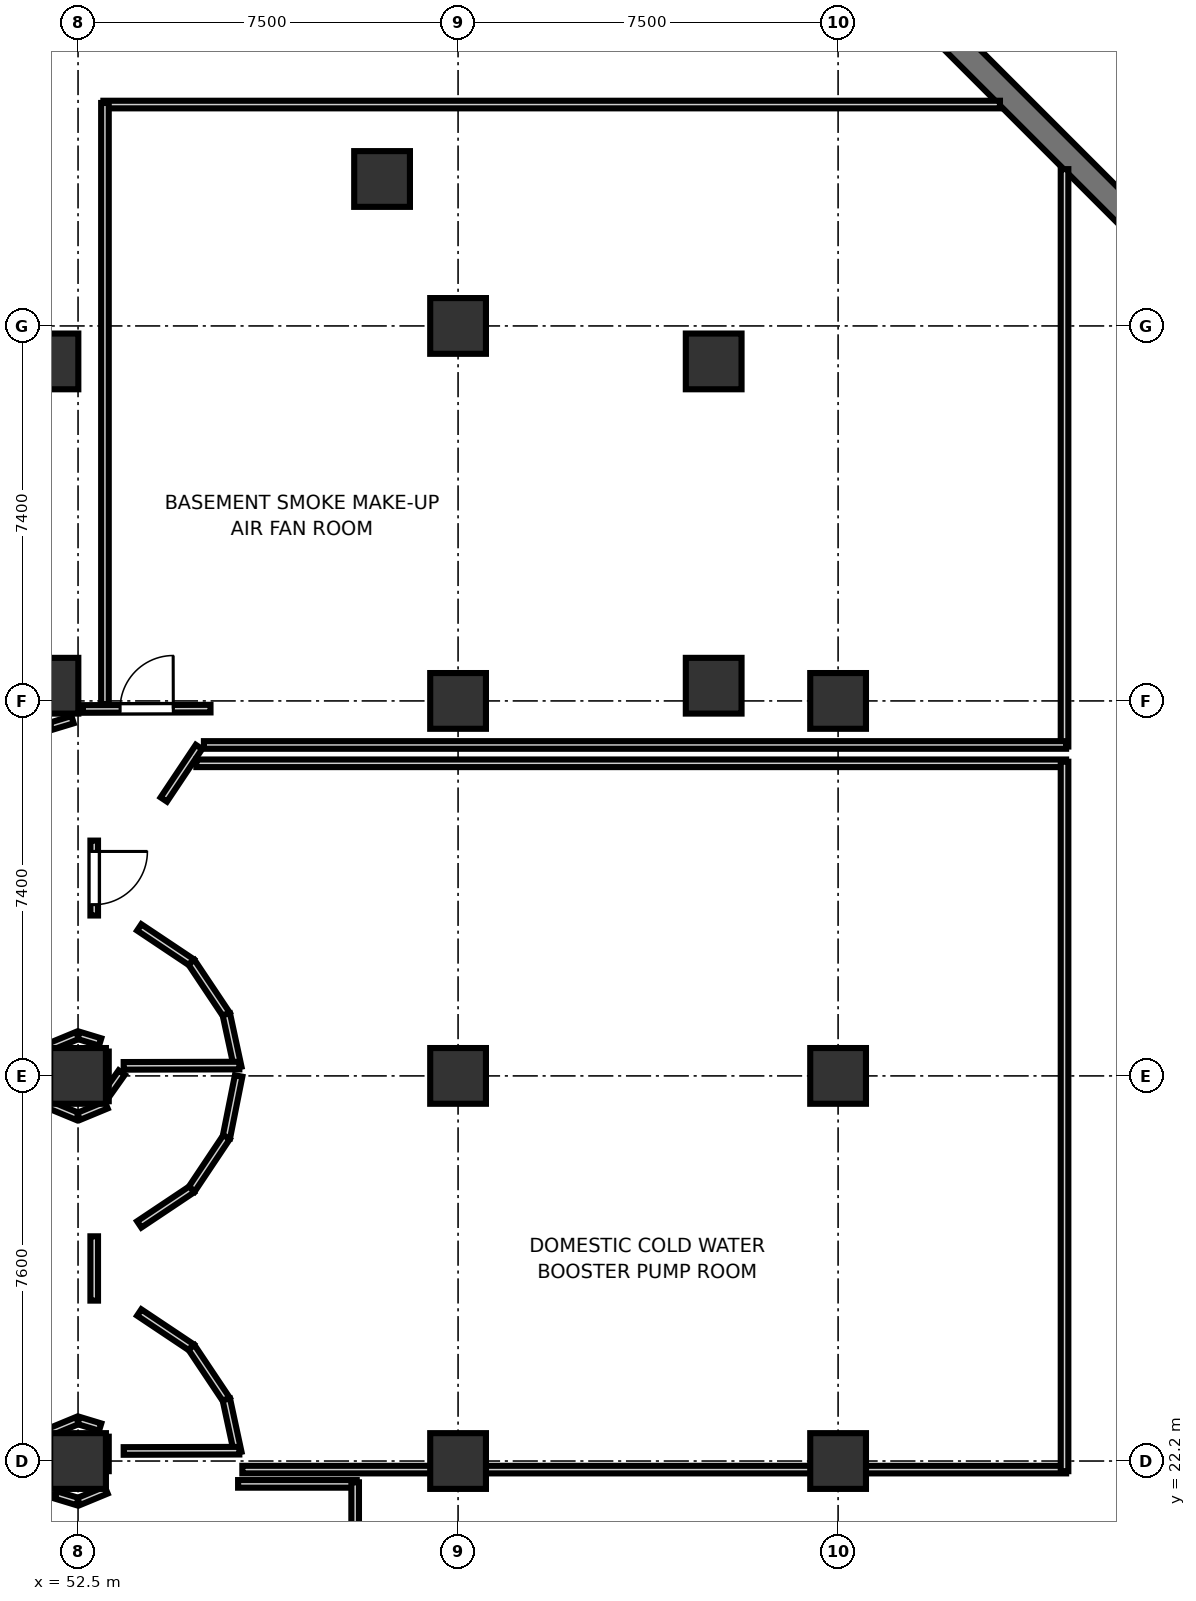
"""IFC4 building model, lengths in metres.
Left out: names, types, materials, properties, quantities, classifications, styles, units other than length and angle.
Written with IfcOpenShell. Run it as: python <this file> out.ifc"""

import sys

from ifc_helpers import new_model, si_unit, direction, frame, frame_2d, origin, origin_2d, place, context, subcontext, project, spatial, rectangle, extrude, element, fill, save


model = new_model("IFC4")
c1 = context("Model", 3, precision=1e-05, world=origin(), true_north=direction((0.0, 1.0)))
c2 = subcontext(c1, "Body", "Model", "MODEL_VIEW")
j1 = project(units=[si_unit("LENGTHUNIT", "METRE"), si_unit("PLANEANGLEUNIT", "RADIAN")], contexts=[c1])
p1 = place(None, origin())
s1 = spatial("IfcSite", under=j1, at=p1, CompositionType="ELEMENT")
p2 = place(p1, origin())
s2 = spatial("IfcBuilding", under=s1, at=p2, CompositionType="ELEMENT")
p3 = place(p2, frame((0.0, 0.0, -5.6)))
s3 = spatial("IfcBuildingStorey", under=s2, at=p3, CompositionType="ELEMENT", Elevation=-5.6)
for number, where, z_axis, x_axis in (
    (1, (51.955, 43.9, 0.0), (0.0, 0.0, 1.0), (1.0, 0.0, 0.0)),
    (2, (51.955, 37.5, 0.0), (0.0, 0.0, 1.0), (1.0, 0.0, 0.0)),
    (3, (65.045, 43.9, 0.0), (0.0, 0.0, 1.0), (1.0, 0.0, 0.0)),
    (4, (65.045, 37.5, 0.0), (0.0, 0.0, 1.0), (1.0, 0.0, 0.0)),
    (5, (52.5, 22.2, 0.0), (0.0, 0.0, 1.0), (1.0, 0.0, 0.0)),
    (6, (52.5, 29.8, 0.0), (0.0, 0.0, 1.0), (1.0, 0.0, 0.0)),
    (7, (60.0, 22.2, 0.0), (0.0, 0.0, 1.0), (1.0, 0.0, 0.0)),
    (8, (60.0, 29.8, 0.0), (0.0, 0.0, 1.0), (1.0, 0.0, 0.0)),
    (9, (60.0, 37.2, 0.0), (0.0, 0.0, 1.0), (1.0, 0.0, 0.0)),
    (10, (60.0, 44.6, 0.0), (0.0, 0.0, 1.0), (1.0, 0.0, 0.0)),
    (11, (67.5, 22.2, 0.0), (0.0, 0.0, 1.0), (1.0, 0.0, 0.0)),
    (12, (67.5, 29.8, 0.0), (0.0, 0.0, 1.0), (1.0, 0.0, 0.0)),
    (13, (67.5, 37.2, 0.0), (0.0, 0.0, 1.0), (1.0, 0.0, 0.0)),
    (14, (58.5, 47.5, 0.0), (0.0, 0.0, 1.0), (1.0, 0.0, 0.0)),
):
    element("IfcColumn", number, at=place(p3, frame(where, z_axis=z_axis, x_axis=x_axis)), inside=s3, PredefinedType="COLUMN", context=c2, shape_type="SweptSolid", body=[
        extrude(rectangle(XDim=1.1, YDim=1.1, at=origin_2d()), origin(), (0.0, 0.0, 1.0), 5.6),
    ])
p4 = place(p3, frame((73.5, 46.5, 0.0), z_axis=(0.0, 0.0, 1.0), x_axis=(-0.707106781187, 0.707106781187, 0.0)))
e15 = element("IfcWall", 15, at=p4, inside=s3, PredefinedType="SOLIDWALL", context=c2, shape_type="SweptSolid", body=[
    extrude(rectangle(XDim=5.657, YDim=0.5, at=frame_2d((2.828, 0.0))), origin(), (0.0, 0.0, 1.0), 5.3),
])
p5 = place(p3, frame((51.964, 36.7, 0.0), z_axis=(0.0, 0.0, 1.0), x_axis=(0.956858887343, 0.290553041134, 0.0)))
e16 = element("IfcWall", 16, at=p5, inside=s3, PredefinedType="PARTITIONING", context=c2, shape_type="SweptSolid", body=[
    extrude(rectangle(XDim=0.447, YDim=0.15, at=frame_2d((0.224, 0.0))), origin(), (0.0, 0.0, 1.0), 4.62),
])
p6 = place(p3, frame((52.596, 37.042, 0.0), z_axis=(0.0, 0.0, 1.0), x_axis=(0.999996822684, 0.002520837443, 0.0)))
e17 = element("IfcWall", 17, at=p6, inside=s3, PredefinedType="PARTITIONING", context=c2, shape_type="SweptSolid", body=[
    extrude(rectangle(XDim=2.518, YDim=0.15, at=frame_2d((1.259, 0.0))), origin(), (0.0, 0.0, 1.0), 4.62),
])
p7 = place(p6, frame((0.734, 0.0, 0.0)))
e18 = element("IfcOpeningElement", 18, at=p7, cuts=e17, PredefinedType="OPENING", context=c2, shape_type="SweptSolid", body=[
    extrude(rectangle(XDim=1.05, YDim=2.15, at=frame_2d((0.525, 1.075))), frame((0.0, 0.085, 0.0), z_axis=(0.0, -1.0, 0.0), x_axis=(1.0, 0.0, 0.0)), (0.0, 0.0, 1.0), 0.17),
])
p8 = place(p3, frame((54.886, 36.292, 0.0), z_axis=(0.0, 0.0, 1.0), x_axis=(-0.555557312883, -0.831478245117, 0.0)))
e19 = element("IfcWall", 19, at=p8, inside=s3, PredefinedType="PARTITIONING", context=c2, shape_type="SweptSolid", body=[
    extrude(rectangle(XDim=1.249, YDim=0.15, at=frame_2d((0.624, 0.0))), origin(), (0.0, 0.0, 1.0), 4.62),
])
p9 = place(p3, frame((52.819, 34.444, 0.0), z_axis=(0.0, 0.0, 1.0), x_axis=(0.0, -1.0, 0.0)))
e20 = element("IfcWall", 20, at=p9, inside=s3, PredefinedType="PARTITIONING", context=c2, shape_type="SweptSolid", body=[
    extrude(rectangle(XDim=1.478, YDim=0.15, at=frame_2d((0.739, 0.0))), origin(), (0.0, 0.0, 1.0), 4.62),
])
p10 = place(p9, frame((0.214, 0.0, 0.0)))
e21 = element("IfcOpeningElement", 21, at=p10, cuts=e20, PredefinedType="OPENING", context=c2, shape_type="SweptSolid", body=[
    extrude(rectangle(XDim=1.05, YDim=2.15, at=frame_2d((0.525, 1.075))), frame((0.0, 0.085, 0.0), z_axis=(0.0, -1.0, 0.0), x_axis=(1.0, 0.0, 0.0)), (0.0, 0.0, 1.0), 0.17),
])
for number, where, z_axis, x_axis in (
    (22, (53.708, 32.731, 0.0), (0.0, 0.0, 1.0), (0.831, -0.556, 0.0)),
    (23, (54.737, 32.045, 0.0), (0.0, 0.0, 1.0), (0.556, -0.831, 0.0)),
):
    element("IfcWall", number, at=place(p3, frame(where, z_axis=z_axis, x_axis=x_axis)), inside=s3, PredefinedType="PARTITIONING", context=c2, shape_type="SweptSolid", body=[
        extrude(rectangle(XDim=1.249, YDim=0.15, at=frame_2d((0.624, 0.0))), origin(), (0.0, 0.0, 1.0), 4.62),
    ])
p11 = place(p3, frame((55.426, 31.018, 0.0), z_axis=(0.0, 0.0, 1.0), x_axis=(0.210629490676, -0.977565965885, 0.0)))
e24 = element("IfcWall", 24, at=p11, inside=s3, PredefinedType="PARTITIONING", context=c2, shape_type="SweptSolid", body=[
    extrude(rectangle(XDim=1.076, YDim=0.15, at=frame_2d((0.538, 0.0))), origin(), (0.0, 0.0, 1.0), 4.62),
])
p12 = place(p3, frame((55.683, 30.004, 0.0), z_axis=(0.0, 0.0, 1.0), x_axis=(-0.99999670426, -0.002567385634, 0.0)))
e25 = element("IfcWall", 25, at=p12, inside=s3, PredefinedType="PARTITIONING", context=c2, shape_type="SweptSolid", body=[
    extrude(rectangle(XDim=2.282, YDim=0.15, at=frame_2d((1.141, 0.0))), origin(), (0.0, 0.0, 1.0), 4.62),
])
p13 = place(p3, frame((52.937, 30.47, 0.0), z_axis=(0.0, 0.0, 1.0), x_axis=(-0.957010621041, 0.290052876583, 0.0)))
e26 = element("IfcWall", 26, at=p13, inside=s3, PredefinedType="PARTITIONING", context=c2, shape_type="SweptSolid", body=[
    extrude(rectangle(XDim=0.447, YDim=0.15, at=frame_2d((0.224, 0.0))), origin(), (0.0, 0.0, 1.0), 4.62),
])
p14 = place(p3, frame((52.488, 30.599, 0.0), z_axis=(0.0, 0.0, 1.0), x_axis=(-0.923835035561, -0.382790839847, 0.0)))
e27 = element("IfcWall", 27, at=p14, inside=s3, PredefinedType="PARTITIONING", context=c2, shape_type="SweptSolid", body=[
    extrude(rectangle(XDim=0.589, YDim=0.15, at=frame_2d((0.295, 0.0))), origin(), (0.0, 0.0, 1.0), 4.62),
])
for number, where, z_axis, x_axis in (
    (28, (51.944, 29.227, 0.0), (0.0, 0.0, 1.0), (0.924, -0.382, 0.0)),
    (29, (52.512, 29.001, 0.0), (0.0, 0.0, 1.0), (0.924, 0.382, 0.0)),
):
    element("IfcWall", number, at=place(p3, frame(where, z_axis=z_axis, x_axis=x_axis)), inside=s3, PredefinedType="PARTITIONING", context=c2, shape_type="SweptSolid", body=[
        extrude(rectangle(XDim=0.589, YDim=0.15, at=frame_2d((0.294, 0.0))), origin(), (0.0, 0.0, 1.0), 4.62),
    ])
p15 = place(p3, frame((55.669, 29.799, 0.0), z_axis=(0.0, 0.0, 1.0), x_axis=(-0.195624591427, -0.980678856318, 0.0)))
e30 = element("IfcWall", 30, at=p15, inside=s3, PredefinedType="PARTITIONING", context=c2, shape_type="SweptSolid", body=[
    extrude(rectangle(XDim=1.242, YDim=0.15, at=frame_2d((0.621, 0.0))), origin(), (0.0, 0.0, 1.0), 4.62),
])
for number, where, z_axis, x_axis in (
    (31, (55.431, 28.593, 0.0), (0.0, 0.0, 1.0), (-0.556, -0.831, 0.0)),
    (32, (54.746, 27.563, 0.0), (0.0, 0.0, 1.0), (-0.831, -0.556, 0.0)),
):
    element("IfcWall", number, at=place(p3, frame(where, z_axis=z_axis, x_axis=x_axis)), inside=s3, PredefinedType="PARTITIONING", context=c2, shape_type="SweptSolid", body=[
        extrude(rectangle(XDim=1.249, YDim=0.15, at=frame_2d((0.624, 0.0))), origin(), (0.0, 0.0, 1.0), 4.62),
    ])
p16 = place(p3, frame((52.819, 26.635, 0.0), z_axis=(0.0, 0.0, 1.0), x_axis=(0.0, -1.0, 0.0)))
e33 = element("IfcWall", 33, at=p16, inside=s3, PredefinedType="PARTITIONING", context=c2, shape_type="SweptSolid", body=[
    extrude(rectangle(XDim=1.269, YDim=0.15, at=frame_2d((0.635, 0.0))), origin(), (0.0, 0.0, 1.0), 4.62),
])
for number, where, z_axis, x_axis in (
    (34, (53.708, 25.131, 0.0), (0.0, 0.0, 1.0), (0.831, -0.556, 0.0)),
    (35, (54.737, 24.446, 0.0), (0.0, 0.0, 1.0), (0.556, -0.831, 0.0)),
):
    element("IfcWall", number, at=place(p3, frame(where, z_axis=z_axis, x_axis=x_axis)), inside=s3, PredefinedType="PARTITIONING", context=c2, shape_type="SweptSolid", body=[
        extrude(rectangle(XDim=1.249, YDim=0.15, at=frame_2d((0.624, 0.0))), origin(), (0.0, 0.0, 1.0), 4.62),
    ])
p17 = place(p3, frame((55.426, 23.418, 0.0), z_axis=(0.0, 0.0, 1.0), x_axis=(0.210582766426, -0.977576032073, 0.0)))
e36 = element("IfcWall", 36, at=p17, inside=s3, PredefinedType="PARTITIONING", context=c2, shape_type="SweptSolid", body=[
    extrude(rectangle(XDim=1.076, YDim=0.15, at=frame_2d((0.538, 0.0))), origin(), (0.0, 0.0, 1.0), 4.62),
])
p18 = place(p3, frame((55.683, 22.404, 0.0), z_axis=(0.0, 0.0, 1.0), x_axis=(-0.999996973182, -0.002460411894, 0.0)))
e37 = element("IfcWall", 37, at=p18, inside=s3, PredefinedType="PARTITIONING", context=c2, shape_type="SweptSolid", body=[
    extrude(rectangle(XDim=2.282, YDim=0.15, at=frame_2d((1.141, 0.0))), origin(), (0.0, 0.0, 1.0), 4.62),
])
p19 = place(p3, frame((52.937, 22.87, 0.0), z_axis=(0.0, 0.0, 1.0), x_axis=(-0.956858887343, 0.290553041134, 0.0)))
e38 = element("IfcWall", 38, at=p19, inside=s3, PredefinedType="PARTITIONING", context=c2, shape_type="SweptSolid", body=[
    extrude(rectangle(XDim=0.447, YDim=0.15, at=frame_2d((0.224, 0.0))), origin(), (0.0, 0.0, 1.0), 4.62),
])
p20 = place(p3, frame((52.488, 22.999, 0.0), z_axis=(0.0, 0.0, 1.0), x_axis=(-0.923981493772, -0.382437183296, 0.0)))
e39 = element("IfcWall", 39, at=p20, inside=s3, PredefinedType="PARTITIONING", context=c2, shape_type="SweptSolid", body=[
    extrude(rectangle(XDim=0.589, YDim=0.15, at=frame_2d((0.294, 0.0))), origin(), (0.0, 0.0, 1.0), 4.62),
])
p21 = place(p3, frame((51.719, 22.033, 0.0), z_axis=(0.0, 0.0, 1.0), x_axis=(0.555369021078, -0.831604022613, 0.0)))
e40 = element("IfcWall", 40, at=p21, inside=s3, PredefinedType="PARTITIONING", context=c2, shape_type="SweptSolid", body=[
    extrude(rectangle(XDim=0.59, YDim=0.15, at=frame_2d((0.295, 0.0))), origin(), (0.0, 0.0, 1.0), 4.62),
])
p22 = place(p3, frame((52.063, 21.53, 0.0), z_axis=(0.0, 0.0, 1.0), x_axis=(0.957010621041, -0.290052876583, 0.0)))
e41 = element("IfcWall", 41, at=p22, inside=s3, PredefinedType="PARTITIONING", context=c2, shape_type="SweptSolid", body=[
    extrude(rectangle(XDim=0.447, YDim=0.15, at=frame_2d((0.224, 0.0))), origin(), (0.0, 0.0, 1.0), 4.62),
])
p23 = place(p3, frame((52.512, 21.401, 0.0), z_axis=(0.0, 0.0, 1.0), x_axis=(0.923835035561, 0.382790839847, 0.0)))
e42 = element("IfcWall", 42, at=p23, inside=s3, PredefinedType="PARTITIONING", context=c2, shape_type="SweptSolid", body=[
    extrude(rectangle(XDim=0.589, YDim=0.15, at=frame_2d((0.295, 0.0))), origin(), (0.0, 0.0, 1.0), 4.62),
])
p24 = place(p3, frame((55.659, 21.749, 0.0), z_axis=(0.0, 0.0, 1.0), x_axis=(1.0, 0.0, 0.0)))
e43 = element("IfcWall", 43, at=p24, inside=s3, PredefinedType="PARTITIONING", context=c2, shape_type="SweptSolid", body=[
    extrude(rectangle(XDim=2.341, YDim=0.15, at=frame_2d((1.171, 0.0))), origin(), (0.0, 0.0, 1.0), 4.62),
])
p25 = place(p3, frame((57.969, 21.78, 0.0), z_axis=(0.0, 0.0, 1.0), x_axis=(0.0, -1.0, 0.0)))
e44 = element("IfcWall", 44, at=p25, inside=s3, PredefinedType="PARTITIONING", context=c2, shape_type="SweptSolid", body=[
    extrude(rectangle(XDim=3.23, YDim=0.15, at=frame_2d((1.615, 0.0))), origin(), (0.0, 0.0, 1.0), 4.62),
])
p26 = place(p3, frame((72.0, 22.031, 0.0), z_axis=(0.0, 0.0, 1.0), x_axis=(-1.0, 0.0, 0.0)))
e45 = element("IfcWall", 45, at=p26, inside=s3, PredefinedType="PARTITIONING", context=c2, shape_type="SweptSolid", body=[
    extrude(rectangle(XDim=16.257, YDim=0.15, at=frame_2d((8.129, 0.0))), origin(), (0.0, 0.0, 1.0), 4.62),
])
p27 = place(p3, frame((53.031, 22.0, 0.0), z_axis=(0.0, 0.0, 1.0), x_axis=(0.0, 1.0, 0.0)))
e46 = element("IfcWall", 46, at=p27, inside=s3, PredefinedType="PARTITIONING", context=c2, shape_type="SweptSolid", body=[
    extrude(rectangle(XDim=0.68, YDim=0.15, at=frame_2d((0.34, 0.0))), origin(), (0.0, 0.0, 1.0), 4.62),
])
p28 = place(p3, frame((53.362, 29.866, 0.0), z_axis=(0.0, 0.0, 1.0), x_axis=(-0.577825504344, -0.816160331387, 0.0)))
e47 = element("IfcWall", 47, at=p28, inside=s3, PredefinedType="PARTITIONING", context=c2, shape_type="SweptSolid", body=[
    extrude(rectangle(XDim=0.671, YDim=0.15, at=frame_2d((0.335, 0.0))), origin(), (0.0, 0.0, 1.0), 4.62),
])
p29 = place(p3, frame((53.031, 29.301, 0.0), z_axis=(0.0, 0.0, 1.0), x_axis=(0.0, 1.0, 0.0)))
e48 = element("IfcWall", 48, at=p29, inside=s3, PredefinedType="PARTITIONING", context=c2, shape_type="SweptSolid", body=[
    extrude(rectangle(XDim=0.98, YDim=0.15, at=frame_2d((0.49, 0.0))), origin(), (0.0, 0.0, 1.0), 4.62),
])
p30 = place(p3, frame((54.835, 35.969, 0.0), z_axis=(0.0, 0.0, 1.0), x_axis=(1.0, 0.0, 0.0)))
e49 = element("IfcWall", 49, at=p30, inside=s3, PredefinedType="PARTITIONING", context=c2, shape_type="SweptSolid", body=[
    extrude(rectangle(XDim=17.165, YDim=0.15, at=frame_2d((8.583, 0.0))), origin(), (0.0, 0.0, 1.0), 4.62),
])
p31 = place(p3, frame((71.969, 36.0, 0.0), z_axis=(0.0, 0.0, 1.0), x_axis=(0.0, -1.0, 0.0)))
e50 = element("IfcWall", 50, at=p31, inside=s3, PredefinedType="PARTITIONING", context=c2, shape_type="SweptSolid", body=[
    extrude(rectangle(XDim=14.0, YDim=0.15, at=frame_2d((7.0, 0.0))), origin(), (0.0, 0.0, 1.0), 4.62),
])
p32 = place(p3, frame((53.0, 48.969, 0.0), z_axis=(0.0, 0.0, 1.0), x_axis=(1.0, 0.0, 0.0)))
e51 = element("IfcWall", 51, at=p32, inside=s3, PredefinedType="PARTITIONING", context=c2, shape_type="SweptSolid", body=[
    extrude(rectangle(XDim=17.694, YDim=0.15, at=frame_2d((8.847, 0.0))), origin(), (0.0, 0.0, 1.0), 4.62),
])
p33 = place(p3, frame((71.969, 47.694, 0.0), z_axis=(0.0, 0.0, 1.0), x_axis=(0.0, -1.0, 0.0)))
e52 = element("IfcWall", 52, at=p33, inside=s3, PredefinedType="PARTITIONING", context=c2, shape_type="SweptSolid", body=[
    extrude(rectangle(XDim=11.394, YDim=0.15, at=frame_2d((5.697, 0.0))), origin(), (0.0, 0.0, 1.0), 4.62),
])
p34 = place(p3, frame((72.0, 36.331, 0.0), z_axis=(0.0, 0.0, 1.0), x_axis=(-1.0, 0.0, 0.0)))
e53 = element("IfcWall", 53, at=p34, inside=s3, PredefinedType="PARTITIONING", context=c2, shape_type="SweptSolid", body=[
    extrude(rectangle(XDim=17.016, YDim=0.15, at=frame_2d((8.508, 0.0))), origin(), (0.0, 0.0, 1.0), 4.62),
])
p35 = place(p3, frame((53.031, 37.135, 0.0), z_axis=(0.0, 0.0, 1.0), x_axis=(0.0, 1.0, 0.0)))
e54 = element("IfcWall", 54, at=p35, inside=s3, PredefinedType="PARTITIONING", context=c2, shape_type="SweptSolid", body=[
    extrude(rectangle(XDim=11.865, YDim=0.15, at=frame_2d((5.932, 0.0))), origin(), (0.0, 0.0, 1.0), 4.62),
])
p36 = place(p10, origin())
e55 = element("IfcDoor", 55, at=p36, inside=s3, OperationType="SINGLE_SWING_LEFT", PredefinedType="DOOR", context=c2, shape_type="SweptSolid", body=[
    extrude(rectangle(XDim=1.05, YDim=2.15, at=frame_2d((0.525, 1.075))), frame((0.0, 0.025, 0.0), z_axis=(0.0, -1.0, 0.0), x_axis=(1.0, 0.0, 0.0)), (0.0, 0.0, 1.0), 0.05),
])
fill(e21, e55)
p37 = place(p7, origin())
e56 = element("IfcDoor", 56, at=p37, inside=s3, OperationType="SINGLE_SWING_RIGHT", PredefinedType="DOOR", context=c2, shape_type="SweptSolid", body=[
    extrude(rectangle(XDim=1.05, YDim=2.15, at=frame_2d((0.525, 1.075))), frame((0.0, 0.025, 0.0), z_axis=(0.0, -1.0, 0.0), x_axis=(1.0, 0.0, 0.0)), (0.0, 0.0, 1.0), 0.05),
])
fill(e18, e56)
save(model, sys.argv[1])
